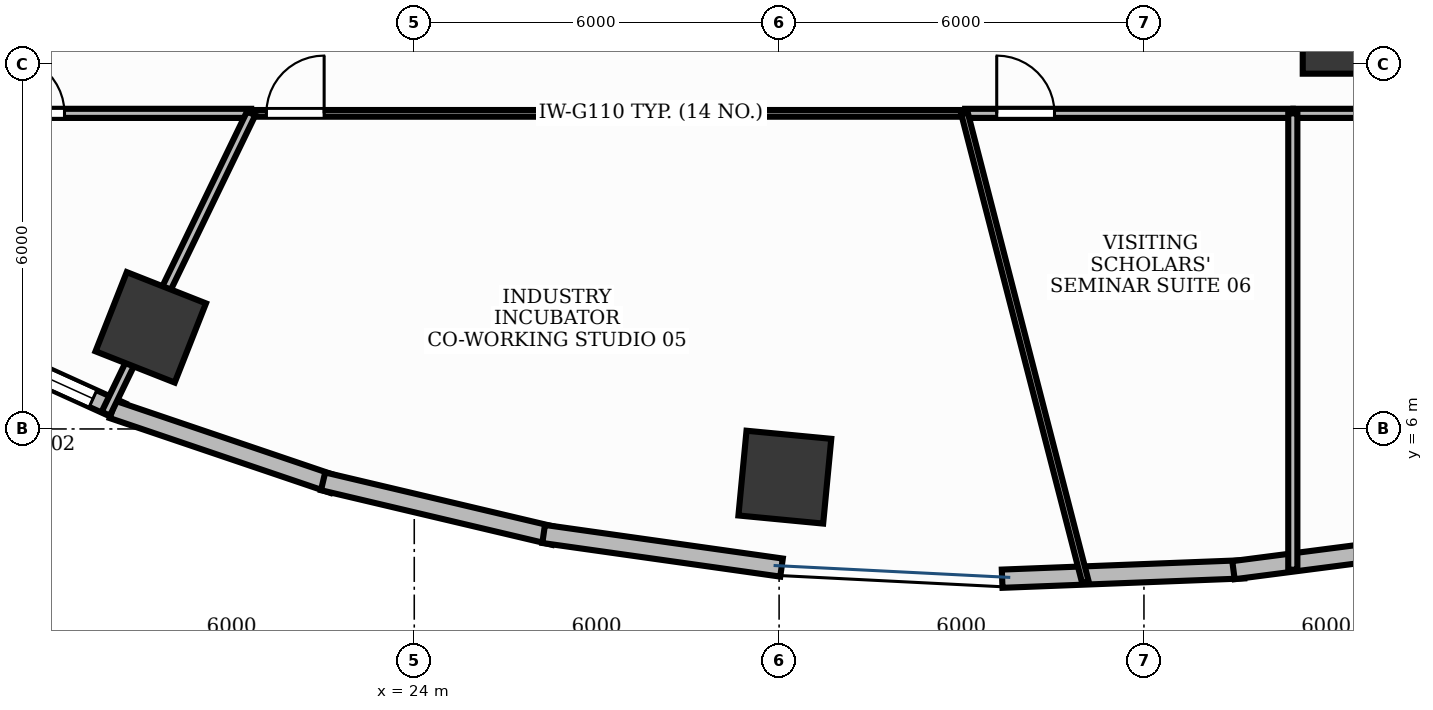
"""IFC4 building model, lengths in metres.
Left out: names, types, materials, properties, quantities, classifications, styles, units other than length and angle.
Written with IfcOpenShell. Run it as: python <this file> out.ifc"""

import sys

from ifc_helpers import new_model, si_unit, direction, frame, frame_2d, origin, origin_2d, place, context, subcontext, project, spatial, rectangle, extrude, element, fill, save


model = new_model("IFC4")
c1 = context("Model", 3, precision=1e-05, world=origin(), true_north=direction((0.0, 1.0)))
c2 = subcontext(c1, "Body", "Model", "MODEL_VIEW")
j1 = project(units=[si_unit("LENGTHUNIT", "METRE"), si_unit("PLANEANGLEUNIT", "RADIAN")], contexts=[c1])
p1 = place(None, origin())
s1 = spatial("IfcSite", under=j1, at=p1, CompositionType="ELEMENT")
p2 = place(p1, origin())
s2 = spatial("IfcBuilding", under=s1, at=p2, CompositionType="ELEMENT")
p3 = place(p2, frame((0.0, 0.0, 5.4)))
s3 = spatial("IfcBuildingStorey", under=s2, at=p3, CompositionType="ELEMENT", Elevation=5.4)
for number, where, z_axis, x_axis in (
    (1, (19.667, 7.671, -0.0), (0.0, 0.0, 1.0), (-0.93, 0.367, 0.0)),
    (2, (30.094, 5.208, -0.0), (0.0, 0.0, 1.0), (-0.995, 0.095, 0.0)),
):
    element("IfcColumn", number, at=place(p3, frame(where, z_axis=z_axis, x_axis=x_axis)), inside=s3, PredefinedType="COLUMN", context=c2, shape_type="SweptSolid", body=[
        extrude(rectangle(XDim=1.4, YDim=1.4, at=origin_2d()), origin(), (0.0, 0.0, 1.0), 4.501),
    ])
p4 = place(p3, frame((39.161, 12.392, -0.0), z_axis=(0.0, 0.0, 1.0), x_axis=(1.0, 0.0, 0.0)))
e3 = element("IfcColumn", 3, at=p4, inside=s3, PredefinedType="COLUMN", context=c2, shape_type="SweptSolid", body=[
    extrude(rectangle(XDim=1.1, YDim=1.1, at=origin_2d()), origin(), (0.0, 0.0, 1.0), 4.501),
])
p5 = place(p3, frame((15.822, 7.812, 0.0), z_axis=(0.0, 0.0, 1.0), x_axis=(0.910608120407, -0.413270917254, 0.0)))
e4 = element("IfcWall", 4, at=p5, inside=s3, PredefinedType="STANDARD", context=c2, shape_type="SweptSolid", body=[
    extrude(rectangle(XDim=3.7, YDim=0.3, at=frame_2d((1.85, 0.0))), origin(), (0.0, 0.0, 1.0), 4.5),
])
p6 = place(p5, frame((1.679, 0.0, 0.95)))
e5 = element("IfcOpeningElement", 5, at=p6, cuts=e4, PredefinedType="OPENING", context=c2, shape_type="SweptSolid", body=[
    extrude(rectangle(XDim=1.5, YDim=1.8, at=frame_2d((0.75, 0.9))), frame((0.0, 0.165, 0.0), z_axis=(0.0, -1.0, 0.0), x_axis=(1.0, 0.0, 0.0)), (0.0, 0.0, 1.0), 0.33),
])
p7 = place(p3, frame((19.04, 6.321, 0.0), z_axis=(0.0, 0.0, 1.0), x_axis=(0.94702579403, -0.321157508773, 0.0)))
e6 = element("IfcWall", 6, at=p7, inside=s3, PredefinedType="STANDARD", context=c2, shape_type="SweptSolid", body=[
    extrude(rectangle(XDim=3.83, YDim=0.3, at=frame_2d((1.915, 0.0))), origin(), (0.0, 0.0, 1.0), 4.5),
])
p8 = place(p3, frame((22.5, 5.138, 0.0), z_axis=(0.0, 0.0, 1.0), x_axis=(0.973197600754, -0.229970497863, 0.0)))
e7 = element("IfcWall", 7, at=p8, inside=s3, PredefinedType="STANDARD", context=c2, shape_type="SweptSolid", body=[
    extrude(rectangle(XDim=3.901, YDim=0.3, at=frame_2d((1.951, 0.0))), origin(), (0.0, 0.0, 1.0), 4.5),
])
p9 = place(p3, frame((26.128, 4.273, 0.0), z_axis=(0.0, 0.0, 1.0), x_axis=(0.990165832998, -0.139898617443, 0.0)))
e8 = element("IfcWall", 8, at=p9, inside=s3, PredefinedType="STANDARD", context=c2, shape_type="SweptSolid", body=[
    extrude(rectangle(XDim=3.951, YDim=0.3, at=frame_2d((1.976, 0.0))), origin(), (0.0, 0.0, 1.0), 4.5),
])
p10 = place(p3, frame((33.668, 3.538, 0.0), z_axis=(0.0, 0.0, 1.0), x_axis=(0.999245411623, 0.038840794937, 0.0)))
e9 = element("IfcWall", 9, at=p10, inside=s3, PredefinedType="STANDARD", context=c2, shape_type="SweptSolid", body=[
    extrude(rectangle(XDim=3.979, YDim=0.3, at=frame_2d((1.989, 0.0))), origin(), (0.0, 0.0, 1.0), 4.5),
])
p11 = place(p3, frame((37.472, 3.678, 0.0), z_axis=(0.0, 0.0, 1.0), x_axis=(0.991734095036, 0.128310111617, 0.0)))
e10 = element("IfcWall", 10, at=p11, inside=s3, PredefinedType="STANDARD", context=c2, shape_type="SweptSolid", body=[
    extrude(rectangle(XDim=3.956, YDim=0.3, at=frame_2d((1.978, 0.0))), origin(), (0.0, 0.0, 1.0), 4.5),
])
p12 = place(p3, frame((17.058, 11.19, 0.0), z_axis=(0.0, 0.0, 1.0), x_axis=(1.0, 0.0, 0.0)))
e11 = element("IfcWall", 11, at=p12, inside=s3, PredefinedType="PARTITIONING", context=c2, shape_type="SweptSolid", body=[
    extrude(rectangle(XDim=4.26, YDim=0.15, at=frame_2d((2.13, 0.0))), origin(), (0.0, 0.0, 1.0), 3.51),
])
p13 = place(p12, frame((0.24, 0.0, 0.0)))
e12 = element("IfcOpeningElement", 12, at=p13, cuts=e11, PredefinedType="OPENING", context=c2, shape_type="SweptSolid", body=[
    extrude(rectangle(XDim=0.95, YDim=2.15, at=frame_2d((0.475, 1.075))), frame((0.0, 0.09, 0.0), z_axis=(0.0, -1.0, 0.0), x_axis=(1.0, 0.0, 0.0)), (0.0, 0.0, 1.0), 0.18),
])
p14 = place(p3, frame((21.328, 11.19, 0.0), z_axis=(0.0, 0.0, 1.0), x_axis=(1.0, 0.0, 0.0)))
e13 = element("IfcWall", 13, at=p14, inside=s3, PredefinedType="MOVABLE", context=c2, shape_type="SweptSolid", body=[
    extrude(rectangle(XDim=11.721, YDim=0.11, at=frame_2d((5.861, 0.0))), origin(), (0.0, 0.0, 1.0), 3.51),
])
p15 = place(p14, frame((0.24, 0.0, 0.0)))
e14 = element("IfcOpeningElement", 14, at=p15, cuts=e13, PredefinedType="OPENING", context=c2, shape_type="SweptSolid", body=[
    extrude(rectangle(XDim=0.95, YDim=2.15, at=frame_2d((0.475, 1.075))), frame((0.0, 0.07, 0.0), z_axis=(0.0, -1.0, 0.0), x_axis=(1.0, 0.0, 0.0)), (0.0, 0.0, 1.0), 0.14),
])
p16 = place(p3, frame((33.059, 11.19, 0.0), z_axis=(0.0, 0.0, 1.0), x_axis=(1.0, 0.0, 0.0)))
e15 = element("IfcWall", 15, at=p16, inside=s3, PredefinedType="PARTITIONING", context=c2, shape_type="SweptSolid", body=[
    extrude(rectangle(XDim=5.389, YDim=0.15, at=frame_2d((2.694, 0.0))), origin(), (0.0, 0.0, 1.0), 3.51),
])
p17 = place(p16, frame((0.52, 0.0, 0.0)))
e16 = element("IfcOpeningElement", 16, at=p17, cuts=e15, PredefinedType="OPENING", context=c2, shape_type="SweptSolid", body=[
    extrude(rectangle(XDim=0.95, YDim=2.15, at=frame_2d((0.475, 1.075))), frame((0.0, 0.09, 0.0), z_axis=(0.0, -1.0, 0.0), x_axis=(1.0, 0.0, 0.0)), (0.0, 0.0, 1.0), 0.18),
])
p18 = place(p3, frame((38.458, 11.19, 0.0), z_axis=(0.0, 0.0, 1.0), x_axis=(1.0, 0.0, 0.0)))
e17 = element("IfcWall", 17, at=p18, inside=s3, PredefinedType="PARTITIONING", context=c2, shape_type="SweptSolid", body=[
    extrude(rectangle(XDim=4.742, YDim=0.15, at=frame_2d((2.371, 0.0))), origin(), (0.0, 0.0, 1.0), 3.51),
])
p19 = place(p18, frame((3.063, 0.0, 0.0)))
e18 = element("IfcOpeningElement", 18, at=p19, cuts=e17, PredefinedType="OPENING", context=c2, shape_type="SweptSolid", body=[
    extrude(rectangle(XDim=0.95, YDim=2.15, at=frame_2d((0.475, 1.075))), frame((0.0, 0.09, 0.0), z_axis=(0.0, -1.0, 0.0), x_axis=(1.0, 0.0, 0.0)), (0.0, 0.0, 1.0), 0.18),
])
p20 = place(p3, frame((21.318, 11.19, 0.0), z_axis=(0.0, 0.0, 1.0), x_axis=(-0.435717889699, -0.900083285367, 0.0)))
e19 = element("IfcWall", 19, at=p20, inside=s3, PredefinedType="PARTITIONING", context=c2, shape_type="SweptSolid", body=[
    extrude(rectangle(XDim=5.488, YDim=0.15, at=frame_2d((2.744, 0.0))), origin(), (0.0, 0.0, 1.0), 3.51),
])
p21 = place(p3, frame((33.049, 11.19, 0.0), z_axis=(0.0, 0.0, 1.0), x_axis=(0.249704671189, -0.968322042084, 0.0)))
e20 = element("IfcWall", 20, at=p21, inside=s3, PredefinedType="MOVABLE", context=c2, shape_type="SweptSolid", body=[
    extrude(rectangle(XDim=7.966, YDim=0.11, at=frame_2d((3.983, 0.0))), origin(), (0.0, 0.0, 1.0), 3.51),
])
p22 = place(p3, frame((38.448, 11.19, 0.0), z_axis=(0.0, 0.0, 1.0), x_axis=(0.0, -1.0, 0.0)))
e21 = element("IfcWall", 21, at=p22, inside=s3, PredefinedType="PARTITIONING", context=c2, shape_type="SweptSolid", body=[
    extrude(rectangle(XDim=7.505, YDim=0.15, at=frame_2d((3.752, 0.0))), origin(), (0.0, 0.0, 1.0), 3.51),
])
p23 = place(p6, origin())
e22 = element("IfcWindow", 22, at=p23, inside=s3, PartitioningType="DOUBLE_PANEL_VERTICAL", PredefinedType="WINDOW", context=c2, shape_type="SweptSolid", body=[
    extrude(rectangle(XDim=1.5, YDim=1.8, at=frame_2d((0.75, 0.9))), frame((0.0, 0.03, 0.0), z_axis=(0.0, -1.0, 0.0), x_axis=(1.0, 0.0, 0.0)), (0.0, 0.0, 1.0), 0.06),
])
fill(e5, e22)
p24 = place(p13, origin())
e23 = element("IfcDoor", 23, at=p24, inside=s3, OperationType="SINGLE_SWING_LEFT", PredefinedType="DOOR", context=c2, shape_type="SweptSolid", body=[
    extrude(rectangle(XDim=0.95, YDim=2.15, at=frame_2d((0.475, 1.075))), frame((0.0, 0.025, 0.0), z_axis=(0.0, -1.0, 0.0), x_axis=(1.0, 0.0, 0.0)), (0.0, 0.0, 1.0), 0.05),
])
fill(e12, e23)
p25 = place(p15, origin())
e24 = element("IfcDoor", 24, at=p25, inside=s3, OperationType="SINGLE_SWING_RIGHT", PredefinedType="DOOR", context=c2, shape_type="SweptSolid", body=[
    extrude(rectangle(XDim=0.95, YDim=2.15, at=frame_2d((0.475, 1.075))), frame((0.0, 0.025, 0.0), z_axis=(0.0, -1.0, 0.0), x_axis=(1.0, 0.0, 0.0)), (0.0, 0.0, 1.0), 0.05),
])
fill(e14, e24)
p26 = place(p17, origin())
e25 = element("IfcDoor", 25, at=p26, inside=s3, OperationType="SINGLE_SWING_LEFT", PredefinedType="DOOR", context=c2, shape_type="SweptSolid", body=[
    extrude(rectangle(XDim=0.95, YDim=2.15, at=frame_2d((0.475, 1.075))), frame((0.0, 0.025, 0.0), z_axis=(0.0, -1.0, 0.0), x_axis=(1.0, 0.0, 0.0)), (0.0, 0.0, 1.0), 0.05),
])
fill(e16, e25)
save(model, sys.argv[1])
